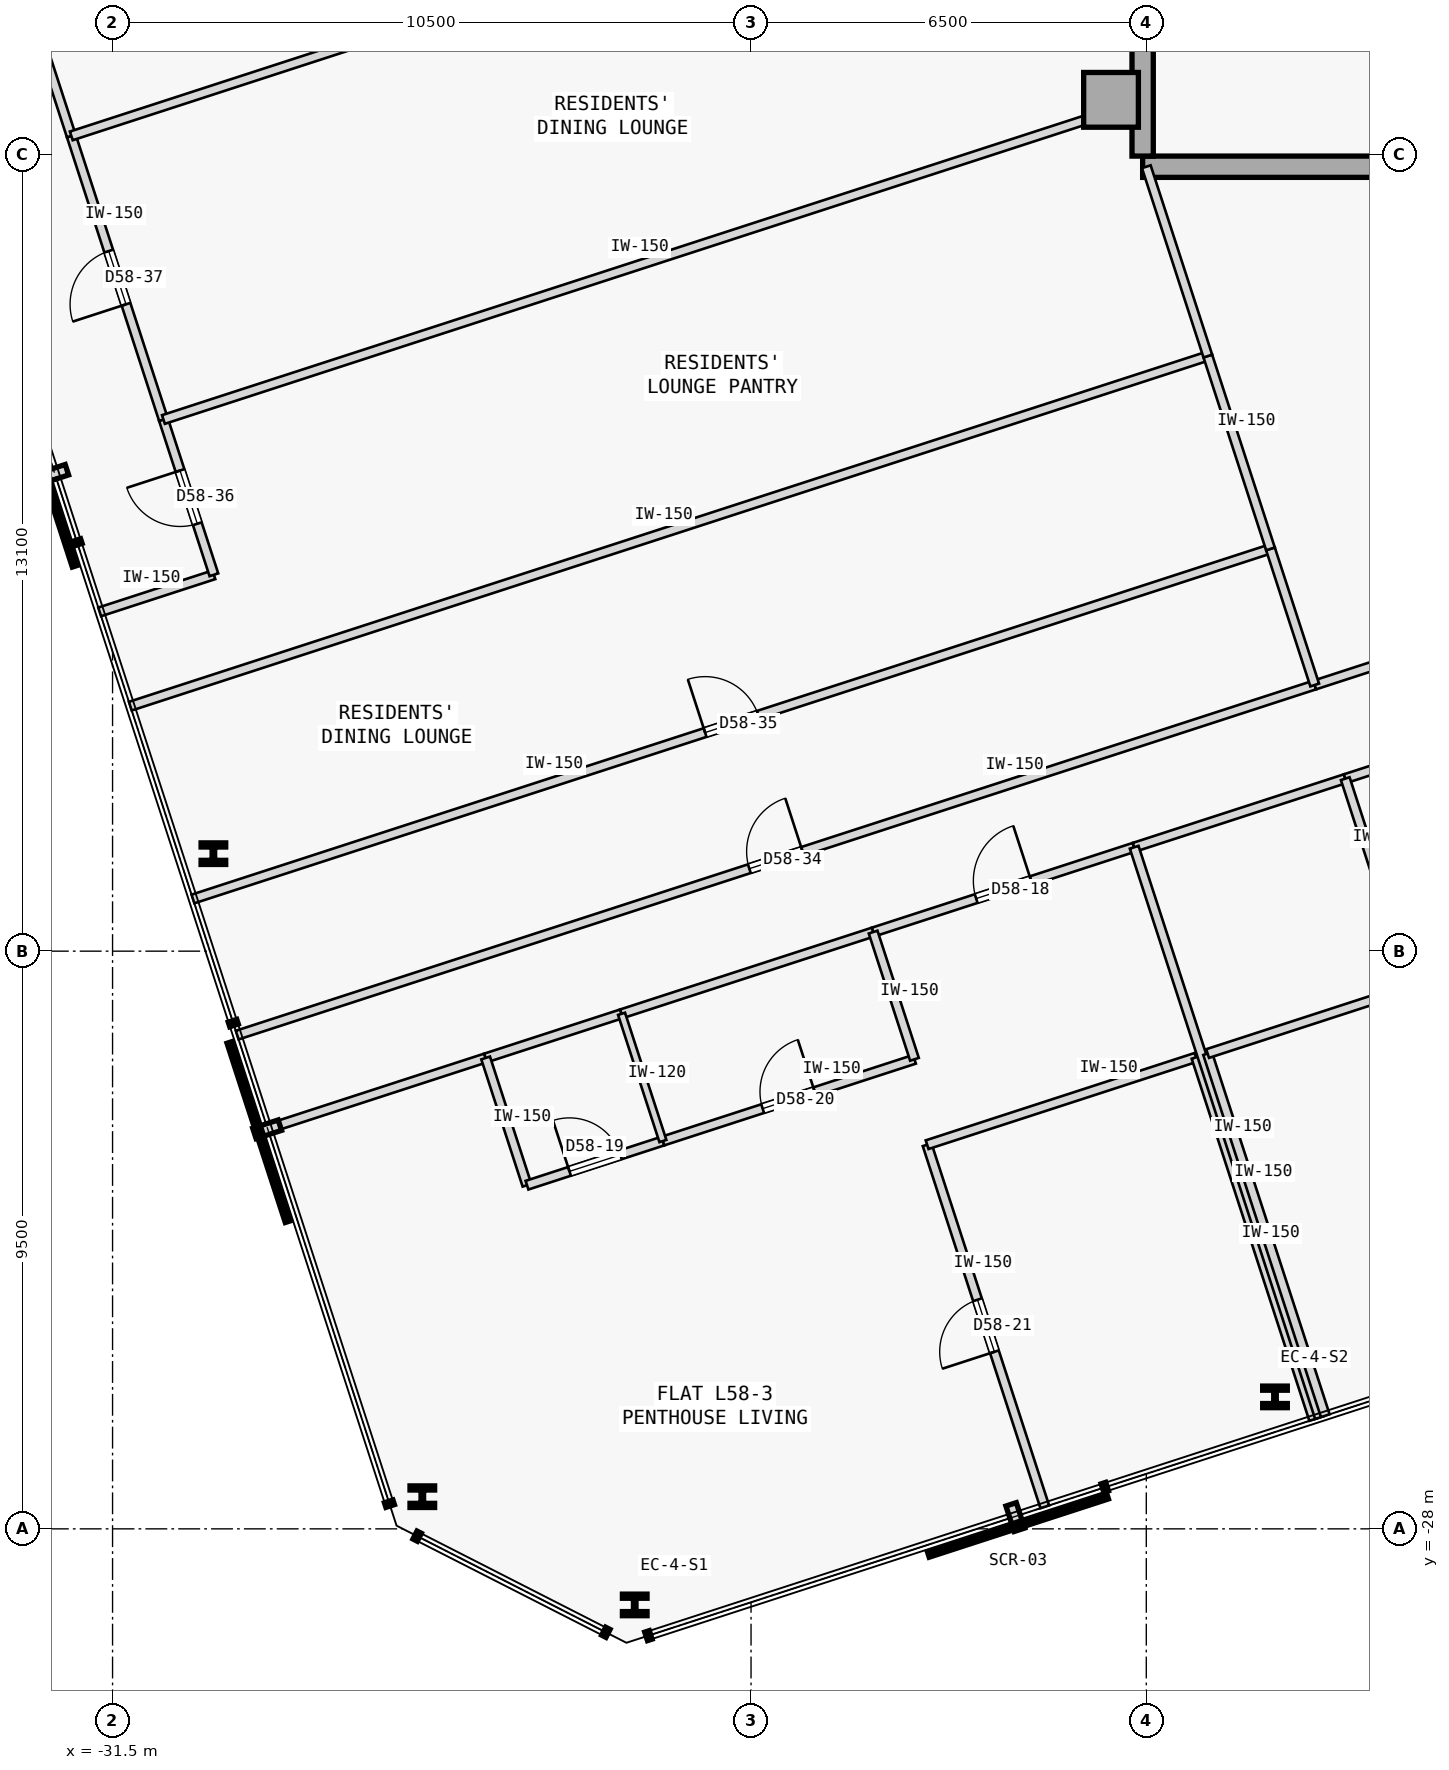
"""IFC4 building model, lengths in metres.
Left out: names, types, materials, properties, quantities, classifications, styles, units other than length and angle.
Written with IfcOpenShell. Run it as: python <this file> out.ifc"""

import sys

from ifc_helpers import new_model, si_unit, direction, frame, frame_2d, origin, origin_2d, place, context, subcontext, project, spatial, rectangle, i_section, extrude, element, fill, save


model = new_model("IFC4")
c1 = context("Model", 3, precision=1e-05, world=origin(), true_north=direction((0.0, 1.0)))
c2 = subcontext(c1, "Body", "Model", "MODEL_VIEW")
j1 = project(units=[si_unit("LENGTHUNIT", "METRE"), si_unit("PLANEANGLEUNIT", "RADIAN")], contexts=[c1])
p1 = place(None, origin())
s1 = spatial("IfcSite", under=j1, at=p1, CompositionType="ELEMENT")
p2 = place(p1, origin())
s2 = spatial("IfcBuilding", under=s1, at=p2, CompositionType="ELEMENT")
p3 = place(p2, frame((0.0, 0.0, 220.95)))
s3 = spatial("IfcBuildingStorey", under=s2, at=p3, CompositionType="ELEMENT", Elevation=220.95)
p4 = place(p3, frame((-15.08, -4.5, 0.0), z_axis=(0.0, 0.0, 1.0), x_axis=(1.0, 0.0, 0.0)))
e1 = element("IfcColumn", 1, at=p4, inside=s3, PredefinedType="COLUMN", context=c2, shape_type="SweptSolid", body=[
    extrude(rectangle(XDim=0.9, YDim=0.9, at=origin_2d()), origin(), (0.0, 0.0, 1.0), 3.35),
])
p5 = place(p3, frame((-14.56, -5.6, 0.0), z_axis=(0.0, 0.0, 1.0), x_axis=(1.0, 0.0, 0.0)))
e2 = element("IfcWall", 2, at=p5, inside=s3, PredefinedType="SHEAR", context=c2, shape_type="SweptSolid", body=[
    extrude(rectangle(XDim=10.86, YDim=0.35, at=frame_2d((5.43, 0.0))), origin(), (0.0, 0.0, 1.0), 3.125),
])
p6 = place(p3, frame((-14.56, -5.425, 0.0), z_axis=(0.0, 0.0, 1.0), x_axis=(0.0, 1.0, 0.0)))
e3 = element("IfcWall", 3, at=p6, inside=s3, PredefinedType="SHEAR", context=c2, shape_type="SweptSolid", body=[
    extrude(rectangle(XDim=10.85, YDim=0.35, at=frame_2d((5.425, 0.0))), origin(), (0.0, 0.0, 1.0), 3.125),
])
for number, where, z_axis, x_axis in (
    (4, (-22.913, -29.251, 0.0), (0.0, 0.0, 1.0), (1.0, 0.0, 0.0)),
    (5, (-12.384, -25.83, 0.0), (0.0, 0.0, 1.0), (1.0, 0.0, 0.0)),
    (6, (-29.842, -16.897, 0.0), (0.0, 0.0, 1.0), (1.0, 0.0, 0.0)),
    (7, (-26.406, -27.471, 0.0), (0.0, 0.0, 1.0), (1.0, 0.0, 0.0)),
):
    element("IfcColumn", number, at=place(p3, frame(where, z_axis=z_axis, x_axis=x_axis)), inside=s3, PredefinedType="COLUMN", context=c2, shape_type="SweptSolid", body=[
        extrude(i_section(OverallWidth=0.405, OverallDepth=0.355, WebThickness=0.042, FlangeThickness=0.068, FilletRadius=0.015, at=origin_2d()), origin(), (0.0, 0.0, 1.0), 3.35),
    ])
p7 = place(p3, frame((-28.95, -21.421, 0.0), z_axis=(0.0, 0.0, 1.0), x_axis=(0.951052151329, 0.309030428036, 0.0)))
e8 = element("IfcWall", 8, at=p7, inside=s3, PredefinedType="PARTITIONING", context=c2, shape_type="SweptSolid", body=[
    extrude(rectangle(XDim=3.77, YDim=0.15, at=frame_2d((1.885, 0.0))), origin(), (0.0, 0.0, 1.0), 3.125),
])
p8 = place(p3, frame((-18.992, -18.186, 0.0), z_axis=(0.0, 0.0, 1.0), x_axis=(0.951067846467, 0.308982121516, 0.0)))
e9 = element("IfcWall", 9, at=p8, inside=s3, PredefinedType="PARTITIONING", context=c2, shape_type="SweptSolid", body=[
    extrude(rectangle(XDim=4.514, YDim=0.15, at=frame_2d((2.257, 0.0))), origin(), (0.0, 0.0, 1.0), 3.125),
])
p9 = place(p8, frame((1.782, 0.0, 0.0)))
e10 = element("IfcOpeningElement", 10, at=p9, cuts=e9, PredefinedType="OPENING", context=c2, shape_type="SweptSolid", body=[
    extrude(rectangle(XDim=0.95, YDim=2.15, at=frame_2d((0.475, 1.075))), frame((0.0, 0.085, 0.0), z_axis=(0.0, -1.0, 0.0), x_axis=(1.0, 0.0, 0.0)), (0.0, 0.0, 1.0), 0.17),
])
p10 = place(p3, frame((-25.365, -20.256, 0.0), z_axis=(0.0, 0.0, 1.0), x_axis=(0.951076048914, 0.308956872689, 0.0)))
e11 = element("IfcWall", 11, at=p10, inside=s3, PredefinedType="PARTITIONING", context=c2, shape_type="SweptSolid", body=[
    extrude(rectangle(XDim=2.35, YDim=0.15, at=frame_2d((1.175, 0.0))), origin(), (0.0, 0.0, 1.0), 3.125),
])
p11 = place(p3, frame((-23.129, -19.53, 0.0), z_axis=(0.0, 0.0, 1.0), x_axis=(0.951036130958, 0.309079726951, 0.0)))
e12 = element("IfcWall", 12, at=p11, inside=s3, PredefinedType="PARTITIONING", context=c2, shape_type="SweptSolid", body=[
    extrude(rectangle(XDim=4.35, YDim=0.15, at=frame_2d((2.175, 0.0))), origin(), (0.0, 0.0, 1.0), 3.125),
])
p12 = place(p3, frame((-14.699, -16.791, 0.0), z_axis=(0.0, 0.0, 1.0), x_axis=(0.951050780541, 0.309034646652, 0.0)))
e13 = element("IfcWall", 13, at=p12, inside=s3, PredefinedType="PARTITIONING", context=c2, shape_type="SweptSolid", body=[
    extrude(rectangle(XDim=3.65, YDim=0.15, at=frame_2d((1.825, 0.0))), origin(), (0.0, 0.0, 1.0), 3.125),
])
p13 = place(p3, frame((-11.228, -15.663, 0.0), z_axis=(0.0, 0.0, 1.0), x_axis=(0.951076048914, 0.308956872689, 0.0)))
e14 = element("IfcWall", 14, at=p13, inside=s3, PredefinedType="PARTITIONING", context=c2, shape_type="SweptSolid", body=[
    extrude(rectangle(XDim=2.35, YDim=0.15, at=frame_2d((1.175, 0.0))), origin(), (0.0, 0.0, 1.0), 3.125),
])
p14 = place(p3, frame((-29.45, -19.881, 0.0), z_axis=(0.0, 0.0, 1.0), x_axis=(0.95105650271, 0.309017036186, 0.0)))
e15 = element("IfcWall", 15, at=p14, inside=s3, PredefinedType="PARTITIONING", context=c2, shape_type="SweptSolid", body=[
    extrude(rectangle(XDim=18.632, YDim=0.15, at=frame_2d((9.316, 0.0))), origin(), (0.0, 0.0, 1.0), 3.125),
])
p15 = place(p14, frame((8.856, 0.0, 0.0)))
e16 = element("IfcOpeningElement", 16, at=p15, cuts=e15, PredefinedType="OPENING", context=c2, shape_type="SweptSolid", body=[
    extrude(rectangle(XDim=0.92, YDim=2.15, at=frame_2d((0.46, 1.075))), frame((0.0, 0.085, 0.0), z_axis=(0.0, -1.0, 0.0), x_axis=(1.0, 0.0, 0.0)), (0.0, 0.0, 1.0), 0.17),
])
p16 = place(p3, frame((-31.712, -12.921, 0.0), z_axis=(0.0, 0.0, 1.0), x_axis=(0.951054051148, 0.309024581215, 0.0)))
e17 = element("IfcWall", 17, at=p16, inside=s3, PredefinedType="PARTITIONING", context=c2, shape_type="SweptSolid", body=[
    extrude(rectangle(XDim=1.975, YDim=0.15, at=frame_2d((0.988, 0.0))), origin(), (0.0, 0.0, 1.0), 3.125),
])
p17 = place(p3, frame((-29.833, -12.311, 0.0), z_axis=(0.0, 0.0, 1.0), x_axis=(-0.309044953986, 0.951047431213, 0.0)))
e18 = element("IfcWall", 18, at=p17, inside=s3, PredefinedType="PARTITIONING", context=c2, shape_type="SweptSolid", body=[
    extrude(rectangle(XDim=2.685, YDim=0.15, at=frame_2d((1.343, 0.0))), origin(), (0.0, 0.0, 1.0), 3.125),
])
p18 = place(p17, frame((0.883, 0.0, 0.0)))
e19 = element("IfcOpeningElement", 19, at=p18, cuts=e18, PredefinedType="OPENING", context=c2, shape_type="SweptSolid", body=[
    extrude(rectangle(XDim=0.92, YDim=2.15, at=frame_2d((0.46, 1.075))), frame((0.0, 0.085, 0.0), z_axis=(0.0, -1.0, 0.0), x_axis=(1.0, 0.0, 0.0)), (0.0, 0.0, 1.0), 0.17),
])
p19 = place(p3, frame((-30.663, -9.757, 0.0), z_axis=(0.0, 0.0, 1.0), x_axis=(-0.309019653166, 0.951055652397, 0.0)))
e20 = element("IfcWall", 20, at=p19, inside=s3, PredefinedType="PARTITIONING", context=c2, shape_type="SweptSolid", body=[
    extrude(rectangle(XDim=4.904, YDim=0.15, at=frame_2d((2.452, 0.0))), origin(), (0.0, 0.0, 1.0), 3.125),
])
p20 = place(p19, frame((1.992, 0.0, 0.0)))
e21 = element("IfcOpeningElement", 21, at=p20, cuts=e20, PredefinedType="OPENING", context=c2, shape_type="SweptSolid", body=[
    extrude(rectangle(XDim=0.92, YDim=2.15, at=frame_2d((0.46, 1.075))), frame((0.0, 0.085, 0.0), z_axis=(0.0, -1.0, 0.0), x_axis=(1.0, 0.0, 0.0)), (0.0, 0.0, 1.0), 0.17),
])
p21 = place(p3, frame((-32.179, -5.093, 0.0), z_axis=(0.0, 0.0, 1.0), x_axis=(-0.309014532869, 0.951057316083, 0.0)))
e22 = element("IfcWall", 22, at=p21, inside=s3, PredefinedType="PARTITIONING", context=c2, shape_type="SweptSolid", body=[
    extrude(rectangle(XDim=4.707, YDim=0.15, at=frame_2d((2.354, 0.0))), origin(), (0.0, 0.0, 1.0), 3.125),
])
p22 = place(p3, frame((-11.73, -14.123, 0.0), z_axis=(0.0, 0.0, 1.0), x_axis=(0.951052502763, 0.309029346483, 0.0)))
e23 = element("IfcWall", 23, at=p22, inside=s3, PredefinedType="PARTITIONING", context=c2, shape_type="SweptSolid", body=[
    extrude(rectangle(XDim=3.698, YDim=0.15, at=frame_2d((1.849, 0.0))), origin(), (0.0, 0.0, 1.0), 3.125),
])
p23 = place(p22, frame((1.389, 0.0, 0.0)))
e24 = element("IfcOpeningElement", 24, at=p23, cuts=e23, PredefinedType="OPENING", context=c2, shape_type="SweptSolid", body=[
    extrude(rectangle(XDim=0.92, YDim=2.15, at=frame_2d((0.46, 1.075))), frame((0.0, 0.085, 0.0), z_axis=(0.0, -1.0, 0.0), x_axis=(1.0, 0.0, 0.0)), (0.0, 0.0, 1.0), 0.17),
])
p24 = place(p3, frame((-24.685, -22.349, 0.0), z_axis=(0.0, 0.0, 1.0), x_axis=(-0.309060979314, 0.951042223598, 0.0)))
e25 = element("IfcWall", 25, at=p24, inside=s3, PredefinedType="PARTITIONING", context=c2, shape_type="SweptSolid", body=[
    extrude(rectangle(XDim=2.2, YDim=0.15, at=frame_2d((1.1, 0.0))), origin(), (0.0, 0.0, 1.0), 3.125),
])
p25 = place(p3, frame((-24.685, -22.349, 0.0), z_axis=(0.0, 0.0, 1.0), x_axis=(0.951066131077, 0.308987401554, 0.0)))
e26 = element("IfcWall", 26, at=p25, inside=s3, PredefinedType="PARTITIONING", context=c2, shape_type="SweptSolid", body=[
    extrude(rectangle(XDim=2.35, YDim=0.15, at=frame_2d((1.175, 0.0))), origin(), (0.0, 0.0, 1.0), 3.125),
])
p26 = place(p25, frame((0.735, 0.0, 0.0)))
e27 = element("IfcOpeningElement", 27, at=p26, cuts=e26, PredefinedType="OPENING", context=c2, shape_type="SweptSolid", body=[
    extrude(rectangle(XDim=0.88, YDim=2.15, at=frame_2d((0.44, 1.075))), frame((0.0, 0.085, 0.0), z_axis=(0.0, -1.0, 0.0), x_axis=(1.0, 0.0, 0.0)), (0.0, 0.0, 1.0), 0.17),
])
p27 = place(p3, frame((-22.45, -21.623, 0.0), z_axis=(0.0, 0.0, 1.0), x_axis=(0.951057987102, 0.309012467661, 0.0)))
e28 = element("IfcWall", 28, at=p27, inside=s3, PredefinedType="PARTITIONING", context=c2, shape_type="SweptSolid", body=[
    extrude(rectangle(XDim=4.35, YDim=0.15, at=frame_2d((2.175, 0.0))), origin(), (0.0, 0.0, 1.0), 3.125),
])
p28 = place(p27, frame((1.725, 0.0, 0.0)))
e29 = element("IfcOpeningElement", 29, at=p28, cuts=e28, PredefinedType="OPENING", context=c2, shape_type="SweptSolid", body=[
    extrude(rectangle(XDim=0.9, YDim=2.15, at=frame_2d((0.45, 1.075))), frame((0.0, 0.085, 0.0), z_axis=(0.0, -1.0, 0.0), x_axis=(1.0, 0.0, 0.0)), (0.0, 0.0, 1.0), 0.17),
])
p29 = place(p3, frame((-18.312, -20.278, 0.0), z_axis=(0.0, 0.0, 1.0), x_axis=(-0.309028364152, 0.951052821956, 0.0)))
e30 = element("IfcWall", 30, at=p29, inside=s3, PredefinedType="PARTITIONING", context=c2, shape_type="SweptSolid", body=[
    extrude(rectangle(XDim=2.2, YDim=0.15, at=frame_2d((1.1, 0.0))), origin(), (0.0, 0.0, 1.0), 3.125),
])
p30 = place(p3, frame((-16.169, -27.638, 0.0), z_axis=(0.0, 0.0, 1.0), x_axis=(-0.309049046683, 0.951046101272, 0.0)))
e31 = element("IfcWall", 31, at=p30, inside=s3, PredefinedType="PARTITIONING", context=c2, shape_type="SweptSolid", body=[
    extrude(rectangle(XDim=6.262, YDim=0.15, at=frame_2d((3.131, 0.0))), origin(), (0.0, 0.0, 1.0), 3.125),
])
p31 = place(p30, frame((2.681, 0.0, 0.0)))
e32 = element("IfcOpeningElement", 32, at=p31, cuts=e31, PredefinedType="OPENING", context=c2, shape_type="SweptSolid", body=[
    extrude(rectangle(XDim=0.9, YDim=2.15, at=frame_2d((0.45, 1.075))), frame((0.0, 0.085, 0.0), z_axis=(0.0, -1.0, 0.0), x_axis=(1.0, 0.0, 0.0)), (0.0, 0.0, 1.0), 0.17),
])
p32 = place(p3, frame((-18.104, -21.683, 0.0), z_axis=(0.0, 0.0, 1.0), x_axis=(0.951055286502, 0.309020779263, 0.0)))
e33 = element("IfcWall", 33, at=p32, inside=s3, PredefinedType="PARTITIONING", context=c2, shape_type="SweptSolid", body=[
    extrude(rectangle(XDim=4.65, YDim=0.15, at=frame_2d((2.325, 0.0))), origin(), (0.0, 0.0, 1.0), 3.125),
])
p33 = place(p3, frame((-11.747, -26.201, 0.0), z_axis=(0.0, 0.0, 1.0), x_axis=(-0.309013782848, 0.951057559777, 0.0)))
e34 = element("IfcWall", 34, at=p33, inside=s3, PredefinedType="PARTITIONING", context=c2, shape_type="SweptSolid", body=[
    extrude(rectangle(XDim=6.262, YDim=0.15, at=frame_2d((3.131, 0.0))), origin(), (0.0, 0.0, 1.0), 3.125),
])
p34 = place(p3, frame((-11.652, -26.17, 0.0), z_axis=(0.0, 0.0, 1.0), x_axis=(-0.308999867152, 0.951062081097, 0.0)))
e35 = element("IfcWall", 35, at=p34, inside=s3, PredefinedType="PARTITIONING", context=c2, shape_type="SweptSolid", body=[
    extrude(rectangle(XDim=9.862, YDim=0.15, at=frame_2d((4.931, 0.0))), origin(), (0.0, 0.0, 1.0), 3.125),
])
p35 = place(p3, frame((-22.45, -21.623, 0.0), z_axis=(0.0, 0.0, 1.0), x_axis=(-0.308960600764, 0.951074837842, 0.0)))
e36 = element("IfcWall", 36, at=p35, inside=s3, PredefinedType="PARTITIONING", context=c2, shape_type="SweptSolid", body=[
    extrude(rectangle(XDim=2.2, YDim=0.12, at=frame_2d((1.1, 0.0))), origin(), (0.0, 0.0, 1.0), 3.125),
])
p36 = place(p3, frame((-10.548, -17.755, 0.0), z_axis=(0.0, 0.0, 1.0), x_axis=(-0.309060979314, 0.951042223598, 0.0)))
e37 = element("IfcWall", 37, at=p36, inside=s3, PredefinedType="PARTITIONING", context=c2, shape_type="SweptSolid", body=[
    extrude(rectangle(XDim=2.2, YDim=0.15, at=frame_2d((1.1, 0.0))), origin(), (0.0, 0.0, 1.0), 3.125),
])
p37 = place(p3, frame((-11.557, -26.139, 0.0), z_axis=(0.0, 0.0, 1.0), x_axis=(-0.309013782848, 0.951057559777, 0.0)))
e38 = element("IfcWall", 38, at=p37, inside=s3, PredefinedType="PARTITIONING", context=c2, shape_type="SweptSolid", body=[
    extrude(rectangle(XDim=6.262, YDim=0.15, at=frame_2d((3.131, 0.0))), origin(), (0.0, 0.0, 1.0), 3.125),
])
p38 = place(p3, frame((-13.492, -20.184, 0.0), z_axis=(0.0, 0.0, 1.0), x_axis=(0.951065702951, 0.308988719326, 0.0)))
e39 = element("IfcWall", 39, at=p38, inside=s3, PredefinedType="PARTITIONING", context=c2, shape_type="SweptSolid", body=[
    extrude(rectangle(XDim=4.65, YDim=0.15, at=frame_2d((2.325, 0.0))), origin(), (0.0, 0.0, 1.0), 3.125),
])
p39 = place(p3, frame((-30.178, -17.642, 0.0), z_axis=(0.0, 0.0, 1.0), x_axis=(0.95105650271, 0.309017036186, 0.0)))
e40 = element("IfcWall", 40, at=p39, inside=s3, PredefinedType="PARTITIONING", context=c2, shape_type="SweptSolid", body=[
    extrude(rectangle(XDim=18.632, YDim=0.15, at=frame_2d((9.316, 0.0))), origin(), (0.0, 0.0, 1.0), 3.125),
])
p40 = place(p39, frame((8.856, 0.0, 0.0)))
e41 = element("IfcOpeningElement", 41, at=p40, cuts=e40, PredefinedType="OPENING", context=c2, shape_type="SweptSolid", body=[
    extrude(rectangle(XDim=0.92, YDim=2.15, at=frame_2d((0.46, 1.075))), frame((0.0, 0.085, 0.0), z_axis=(0.0, -1.0, 0.0), x_axis=(1.0, 0.0, 0.0)), (0.0, 0.0, 1.0), 0.17),
])
p41 = place(p3, frame((-11.73, -14.123, 0.0), z_axis=(0.0, 0.0, 1.0), x_axis=(-0.309062621189, 0.951041690035, 0.0)))
e42 = element("IfcWall", 42, at=p41, inside=s3, PredefinedType="PARTITIONING", context=c2, shape_type="SweptSolid", body=[
    extrude(rectangle(XDim=2.354, YDim=0.15, at=frame_2d((1.177, 0.0))), origin(), (0.0, 0.0, 1.0), 3.125),
])
p42 = place(p3, frame((-31.208, -14.471, 0.0), z_axis=(0.0, 0.0, 1.0), x_axis=(0.951057753948, 0.309013185244, 0.0)))
e43 = element("IfcWall", 43, at=p42, inside=s3, PredefinedType="PARTITIONING", context=c2, shape_type="SweptSolid", body=[
    extrude(rectangle(XDim=18.632, YDim=0.15, at=frame_2d((9.316, 0.0))), origin(), (0.0, 0.0, 1.0), 3.125),
])
p43 = place(p3, frame((-12.458, -11.884, 0.0), z_axis=(0.0, 0.0, 1.0), x_axis=(-0.308946982245, 0.951079261766, 0.0)))
e44 = element("IfcWall", 44, at=p43, inside=s3, PredefinedType="PARTITIONING", context=c2, shape_type="SweptSolid", body=[
    extrude(rectangle(XDim=3.334, YDim=0.15, at=frame_2d((1.667, 0.0))), origin(), (0.0, 0.0, 1.0), 3.125),
])
p44 = place(p3, frame((-30.663, -9.757, 0.0), z_axis=(0.0, 0.0, 1.0), x_axis=(0.951058192995, 0.309011833974, 0.0)))
e45 = element("IfcWall", 45, at=p44, inside=s3, PredefinedType="PARTITIONING", context=c2, shape_type="SweptSolid", body=[
    extrude(rectangle(XDim=16.657, YDim=0.15, at=frame_2d((8.329, 0.0))), origin(), (0.0, 0.0, 1.0), 3.125),
])
p45 = place(p3, frame((-13.488, -8.713, 0.0), z_axis=(0.0, 0.0, 1.0), x_axis=(-0.309082700143, 0.951035164687, 0.0)))
e46 = element("IfcWall", 46, at=p45, inside=s3, PredefinedType="PARTITIONING", context=c2, shape_type="SweptSolid", body=[
    extrude(rectangle(XDim=3.274, YDim=0.15, at=frame_2d((1.637, 0.0))), origin(), (0.0, 0.0, 1.0), 3.125),
])
p46 = place(p3, frame((-32.179, -5.093, 0.0), z_axis=(0.0, 0.0, 1.0), x_axis=(0.951053885426, 0.309025091239, 0.0)))
e47 = element("IfcWall", 47, at=p46, inside=s3, PredefinedType="PARTITIONING", context=c2, shape_type="SweptSolid", body=[
    extrude(rectangle(XDim=16.657, YDim=0.15, at=frame_2d((8.329, 0.0))), origin(), (0.0, 0.0, 1.0), 3.125),
])
p47 = place(p9, origin())
e48 = element("IfcDoor", 48, at=p47, inside=s3, OperationType="SINGLE_SWING_RIGHT", PredefinedType="DOOR", context=c2, shape_type="SweptSolid", body=[
    extrude(rectangle(XDim=0.95, YDim=2.15, at=frame_2d((0.475, 1.075))), frame((0.0, 0.025, 0.0), z_axis=(0.0, -1.0, 0.0), x_axis=(1.0, 0.0, 0.0)), (0.0, 0.0, 1.0), 0.05),
])
fill(e10, e48)
p48 = place(p26, origin())
e49 = element("IfcDoor", 49, at=p48, inside=s3, OperationType="SINGLE_SWING_LEFT", PredefinedType="DOOR", context=c2, shape_type="SweptSolid", body=[
    extrude(rectangle(XDim=0.88, YDim=2.15, at=frame_2d((0.44, 1.075))), frame((0.0, 0.025, 0.0), z_axis=(0.0, -1.0, 0.0), x_axis=(1.0, 0.0, 0.0)), (0.0, 0.0, 1.0), 0.05),
])
fill(e27, e49)
p49 = place(p28, origin())
e50 = element("IfcDoor", 50, at=p49, inside=s3, OperationType="SINGLE_SWING_RIGHT", PredefinedType="DOOR", context=c2, shape_type="SweptSolid", body=[
    extrude(rectangle(XDim=0.9, YDim=2.15, at=frame_2d((0.45, 1.075))), frame((0.0, 0.025, 0.0), z_axis=(0.0, -1.0, 0.0), x_axis=(1.0, 0.0, 0.0)), (0.0, 0.0, 1.0), 0.05),
])
fill(e29, e50)
p50 = place(p31, origin())
e51 = element("IfcDoor", 51, at=p50, inside=s3, OperationType="SINGLE_SWING_LEFT", PredefinedType="DOOR", context=c2, shape_type="SweptSolid", body=[
    extrude(rectangle(XDim=0.9, YDim=2.15, at=frame_2d((0.45, 1.075))), frame((0.0, 0.025, 0.0), z_axis=(0.0, -1.0, 0.0), x_axis=(1.0, 0.0, 0.0)), (0.0, 0.0, 1.0), 0.05),
])
fill(e32, e51)
p51 = place(p15, origin())
e52 = element("IfcDoor", 52, at=p51, inside=s3, OperationType="SINGLE_SWING_RIGHT", PredefinedType="DOOR", context=c2, shape_type="SweptSolid", body=[
    extrude(rectangle(XDim=0.92, YDim=2.15, at=frame_2d((0.46, 1.075))), frame((0.0, 0.025, 0.0), z_axis=(0.0, -1.0, 0.0), x_axis=(1.0, 0.0, 0.0)), (0.0, 0.0, 1.0), 0.05),
])
fill(e16, e52)
p52 = place(p40, origin())
e53 = element("IfcDoor", 53, at=p52, inside=s3, OperationType="SINGLE_SWING_LEFT", PredefinedType="DOOR", context=c2, shape_type="SweptSolid", body=[
    extrude(rectangle(XDim=0.92, YDim=2.15, at=frame_2d((0.46, 1.075))), frame((0.0, 0.025, 0.0), z_axis=(0.0, -1.0, 0.0), x_axis=(1.0, 0.0, 0.0)), (0.0, 0.0, 1.0), 0.05),
])
fill(e41, e53)
p53 = place(p18, origin())
e54 = element("IfcDoor", 54, at=p53, inside=s3, OperationType="SINGLE_SWING_RIGHT", PredefinedType="DOOR", context=c2, shape_type="SweptSolid", body=[
    extrude(rectangle(XDim=0.92, YDim=2.15, at=frame_2d((0.46, 1.075))), frame((0.0, 0.025, 0.0), z_axis=(0.0, -1.0, 0.0), x_axis=(1.0, 0.0, 0.0)), (0.0, 0.0, 1.0), 0.05),
])
fill(e19, e54)
p54 = place(p20, origin())
e55 = element("IfcDoor", 55, at=p54, inside=s3, OperationType="SINGLE_SWING_LEFT", PredefinedType="DOOR", context=c2, shape_type="SweptSolid", body=[
    extrude(rectangle(XDim=0.92, YDim=2.15, at=frame_2d((0.46, 1.075))), frame((0.0, 0.025, 0.0), z_axis=(0.0, -1.0, 0.0), x_axis=(1.0, 0.0, 0.0)), (0.0, 0.0, 1.0), 0.05),
])
fill(e21, e55)
save(model, sys.argv[1])
